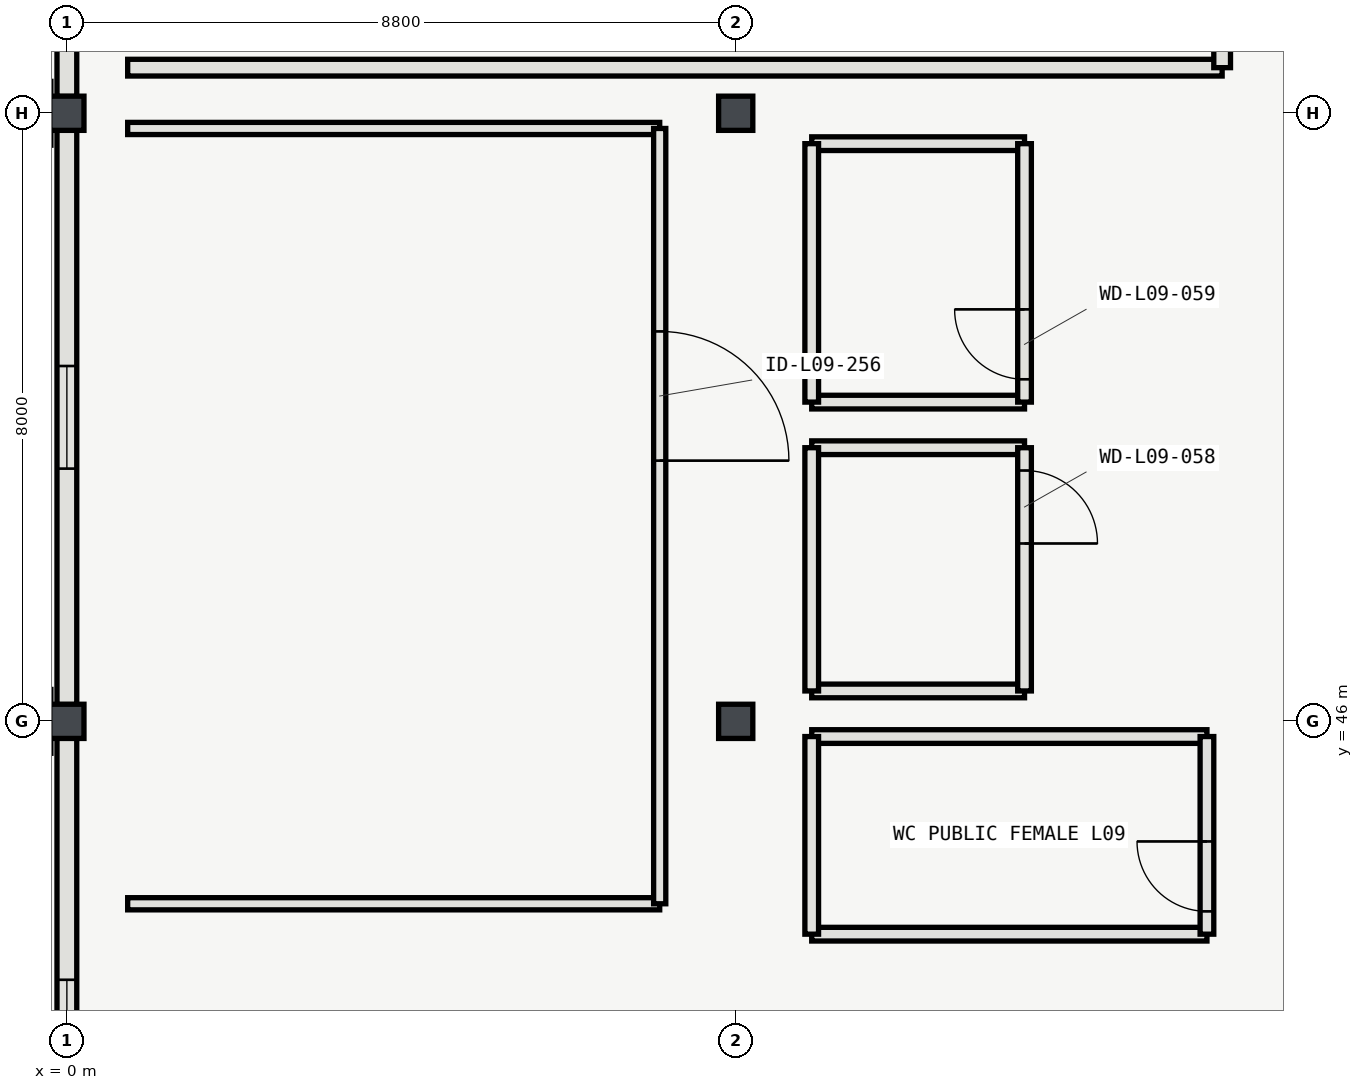
"""IFC4 building model, lengths in metres.
Left out: names, types, materials, properties, quantities, classifications, styles, units other than length and angle.
Written with IfcOpenShell. Run it as: python <this file> out.ifc"""

import sys

from ifc_helpers import new_model, si_unit, direction, frame, frame_2d, origin, origin_2d, place, context, subcontext, project, spatial, rectangle, hollow_rectangle, extrude, element, fill, save


model = new_model("IFC4")
c1 = context("Model", 3, precision=1e-05, world=origin(), true_north=direction((0.0, 1.0)))
c2 = subcontext(c1, "Body", "Model", "MODEL_VIEW")
j1 = project(units=[si_unit("LENGTHUNIT", "METRE"), si_unit("PLANEANGLEUNIT", "RADIAN")], contexts=[c1])
p1 = place(None, origin())
s1 = spatial("IfcSite", under=j1, at=p1, CompositionType="ELEMENT")
p2 = place(p1, origin())
s2 = spatial("IfcBuilding", under=s1, at=p2, CompositionType="ELEMENT")
p3 = place(p2, frame((0.0, 0.0, 41.4)))
s3 = spatial("IfcBuildingStorey", under=s2, at=p3, CompositionType="ELEMENT", Elevation=41.4)
for number, where, z_axis, x_axis in (
    (1, (0.0, 46.0, 0.0), (0.0, 0.0, 1.0), (1.0, 0.0, 0.0)),
    (2, (0.0, 54.0, 0.0), (0.0, 0.0, 1.0), (1.0, 0.0, 0.0)),
    (3, (8.8, 46.0, 0.0), (0.0, 0.0, 1.0), (1.0, 0.0, 0.0)),
    (4, (8.8, 54.0, 0.0), (0.0, 0.0, 1.0), (1.0, 0.0, 0.0)),
):
    element("IfcColumn", number, at=place(p3, frame(where, z_axis=z_axis, x_axis=x_axis)), inside=s3, PredefinedType="COLUMN", context=c2, shape_type="SweptSolid", body=[
        extrude(hollow_rectangle(XDim=0.45, YDim=0.45, WallThickness=0.018, InnerFilletRadius=0.018, OuterFilletRadius=0.036, at=origin_2d()), origin(), (0.0, 0.0, 1.0), 4.2),
    ])
p4 = place(p3, frame((0.0, 45.779, 0.0), z_axis=(0.0, 0.0, 1.0), x_axis=(0.0, -1.0, 0.0)))
e5 = element("IfcWall", 5, at=p4, inside=s3, PredefinedType="SOLIDWALL", context=c2, shape_type="SweptSolid", body=[
    extrude(rectangle(XDim=7.558, YDim=0.26, at=frame_2d((3.779, 0.0))), origin(), (0.0, 0.0, 1.0), 3.473),
])
p5 = place(p4, frame((3.179, 0.0, 0.95)))
e6 = element("IfcOpeningElement", 6, at=p5, cuts=e5, PredefinedType="OPENING", context=c2, shape_type="SweptSolid", body=[
    extrude(rectangle(XDim=1.2, YDim=1.8, at=frame_2d((0.6, 0.9))), frame((0.0, 0.14, 0.0), z_axis=(0.0, -1.0, 0.0), x_axis=(1.0, 0.0, 0.0)), (0.0, 0.0, 1.0), 0.28),
])
p6 = place(p3, frame((0.0, 53.779, 0.0), z_axis=(0.0, 0.0, 1.0), x_axis=(0.0, -1.0, 0.0)))
e7 = element("IfcWall", 7, at=p6, inside=s3, PredefinedType="SOLIDWALL", context=c2, shape_type="SweptSolid", body=[
    extrude(rectangle(XDim=7.558, YDim=0.26, at=frame_2d((3.779, 0.0))), origin(), (0.0, 0.0, 1.0), 3.473),
])
p7 = place(p6, frame((3.104, 0.0, 0.95)))
e8 = element("IfcOpeningElement", 8, at=p7, cuts=e7, PredefinedType="OPENING", context=c2, shape_type="SweptSolid", body=[
    extrude(rectangle(XDim=1.35, YDim=1.8, at=frame_2d((0.675, 0.9))), frame((0.0, 0.14, 0.0), z_axis=(0.0, -1.0, 0.0), x_axis=(1.0, 0.0, 0.0)), (0.0, 0.0, 1.0), 0.28),
])
p8 = place(p3, frame((0.0, 61.779, 0.0), z_axis=(0.0, 0.0, 1.0), x_axis=(0.0, -1.0, 0.0)))
e9 = element("IfcWall", 9, at=p8, inside=s3, PredefinedType="SOLIDWALL", context=c2, shape_type="SweptSolid", body=[
    extrude(rectangle(XDim=7.558, YDim=0.26, at=frame_2d((3.779, 0.0))), origin(), (0.0, 0.0, 1.0), 3.473),
])
p9 = place(p8, frame((3.029, 0.0, 0.95)))
e10 = element("IfcOpeningElement", 10, at=p9, cuts=e9, PredefinedType="OPENING", context=c2, shape_type="SweptSolid", body=[
    extrude(rectangle(XDim=1.5, YDim=1.8, at=frame_2d((0.75, 0.9))), frame((0.0, 0.14, 0.0), z_axis=(0.0, -1.0, 0.0), x_axis=(1.0, 0.0, 0.0)), (0.0, 0.0, 1.0), 0.28),
])
for number, where, z_axis, x_axis in (
    (11, (9.8, 46.4, 0.0), (0.0, 0.0, 1.0), (1.0, 0.0, 0.0)),
    (12, (12.6, 49.6, 0.0), (0.0, 0.0, 1.0), (-1.0, 0.0, 0.0)),
):
    element("IfcWall", number, at=place(p3, frame(where, z_axis=z_axis, x_axis=x_axis)), inside=s3, PredefinedType="PLUMBINGWALL", context=c2, shape_type="SweptSolid", body=[
        extrude(rectangle(XDim=2.8, YDim=0.18, at=frame_2d((1.4, 0.0))), origin(), (0.0, 0.0, 1.0), 3.92),
    ])
p10 = place(p3, frame((9.8, 49.6, 0.0), z_axis=(0.0, 0.0, 1.0), x_axis=(0.0, -1.0, 0.0)))
e13 = element("IfcWall", 13, at=p10, inside=s3, PredefinedType="PLUMBINGWALL", context=c2, shape_type="SweptSolid", body=[
    extrude(rectangle(XDim=3.2, YDim=0.18, at=frame_2d((1.6, 0.0))), origin(), (0.0, 0.0, 1.0), 3.92),
])
p11 = place(p3, frame((12.6, 46.4, 0.0), z_axis=(0.0, 0.0, 1.0), x_axis=(0.0, 1.0, 0.0)))
e14 = element("IfcWall", 14, at=p11, inside=s3, PredefinedType="PLUMBINGWALL", context=c2, shape_type="SweptSolid", body=[
    extrude(rectangle(XDim=3.2, YDim=0.18, at=frame_2d((1.6, 0.0))), origin(), (0.0, 0.0, 1.0), 3.92),
])
p12 = place(p11, frame((1.94, 0.0, 0.0)))
e15 = element("IfcOpeningElement", 15, at=p12, cuts=e14, PredefinedType="OPENING", context=c2, shape_type="SweptSolid", body=[
    extrude(rectangle(XDim=0.96, YDim=2.1, at=frame_2d((0.48, 1.05))), frame((0.0, 0.1, 0.0), z_axis=(0.0, -1.0, 0.0), x_axis=(1.0, 0.0, 0.0)), (0.0, 0.0, 1.0), 0.2),
])
for number, where, z_axis, x_axis in (
    (16, (9.8, 50.2, 0.0), (0.0, 0.0, 1.0), (1.0, 0.0, 0.0)),
    (17, (12.6, 53.6, 0.0), (0.0, 0.0, 1.0), (-1.0, 0.0, 0.0)),
):
    element("IfcWall", number, at=place(p3, frame(where, z_axis=z_axis, x_axis=x_axis)), inside=s3, PredefinedType="PLUMBINGWALL", context=c2, shape_type="SweptSolid", body=[
        extrude(rectangle(XDim=2.8, YDim=0.18, at=frame_2d((1.4, 0.0))), origin(), (0.0, 0.0, 1.0), 3.92),
    ])
p13 = place(p3, frame((9.8, 53.6, 0.0), z_axis=(0.0, 0.0, 1.0), x_axis=(0.0, -1.0, 0.0)))
e18 = element("IfcWall", 18, at=p13, inside=s3, PredefinedType="PLUMBINGWALL", context=c2, shape_type="SweptSolid", body=[
    extrude(rectangle(XDim=3.4, YDim=0.18, at=frame_2d((1.7, 0.0))), origin(), (0.0, 0.0, 1.0), 3.92),
])
p14 = place(p3, frame((12.6, 50.2, 0.0), z_axis=(0.0, 0.0, 1.0), x_axis=(0.0, 1.0, 0.0)))
e19 = element("IfcWall", 19, at=p14, inside=s3, PredefinedType="PLUMBINGWALL", context=c2, shape_type="SweptSolid", body=[
    extrude(rectangle(XDim=3.4, YDim=0.18, at=frame_2d((1.7, 0.0))), origin(), (0.0, 0.0, 1.0), 3.92),
])
p15 = place(p14, frame((0.3, 0.0, 0.0)))
e20 = element("IfcOpeningElement", 20, at=p15, cuts=e19, PredefinedType="OPENING", context=c2, shape_type="SweptSolid", body=[
    extrude(rectangle(XDim=0.92, YDim=2.1, at=frame_2d((0.46, 1.05))), frame((0.0, 0.1, 0.0), z_axis=(0.0, -1.0, 0.0), x_axis=(1.0, 0.0, 0.0)), (0.0, 0.0, 1.0), 0.2),
])
for number, where, z_axis, x_axis in (
    (21, (9.8, 43.2, 0.0), (0.0, 0.0, 1.0), (1.0, 0.0, 0.0)),
    (22, (15.0, 45.8, 0.0), (0.0, 0.0, 1.0), (-1.0, 0.0, 0.0)),
):
    element("IfcWall", number, at=place(p3, frame(where, z_axis=z_axis, x_axis=x_axis)), inside=s3, PredefinedType="PLUMBINGWALL", context=c2, shape_type="SweptSolid", body=[
        extrude(rectangle(XDim=5.2, YDim=0.18, at=frame_2d((2.6, 0.0))), origin(), (0.0, 0.0, 1.0), 3.92),
    ])
p16 = place(p3, frame((9.8, 45.8, 0.0), z_axis=(0.0, 0.0, 1.0), x_axis=(0.0, -1.0, 0.0)))
e23 = element("IfcWall", 23, at=p16, inside=s3, PredefinedType="PLUMBINGWALL", context=c2, shape_type="SweptSolid", body=[
    extrude(rectangle(XDim=2.6, YDim=0.18, at=frame_2d((1.3, 0.0))), origin(), (0.0, 0.0, 1.0), 3.92),
])
p17 = place(p3, frame((15.0, 43.2, 0.0), z_axis=(0.0, 0.0, 1.0), x_axis=(0.0, 1.0, 0.0)))
e24 = element("IfcWall", 24, at=p17, inside=s3, PredefinedType="PLUMBINGWALL", context=c2, shape_type="SweptSolid", body=[
    extrude(rectangle(XDim=2.6, YDim=0.18, at=frame_2d((1.3, 0.0))), origin(), (0.0, 0.0, 1.0), 3.92),
])
p18 = place(p17, frame((0.3, 0.0, 0.0)))
e25 = element("IfcOpeningElement", 25, at=p18, cuts=e24, PredefinedType="OPENING", context=c2, shape_type="SweptSolid", body=[
    extrude(rectangle(XDim=0.92, YDim=2.1, at=frame_2d((0.46, 1.05))), frame((0.0, 0.1, 0.0), z_axis=(0.0, -1.0, 0.0), x_axis=(1.0, 0.0, 0.0)), (0.0, 0.0, 1.0), 0.2),
])
p19 = place(p3, frame((0.8, 54.6, 0.0), z_axis=(0.0, 0.0, 1.0), x_axis=(1.0, 0.0, 0.0)))
e26 = element("IfcWall", 26, at=p19, inside=s3, PredefinedType="PARTITIONING", context=c2, shape_type="SweptSolid", body=[
    extrude(rectangle(XDim=14.4, YDim=0.22, at=frame_2d((7.2, 0.0))), origin(), (0.0, 0.0, 1.0), 3.92),
])
p20 = place(p3, frame((15.2, 54.6, 0.0), z_axis=(0.0, 0.0, 1.0), x_axis=(0.0, 1.0, 0.0)))
e27 = element("IfcWall", 27, at=p20, inside=s3, PredefinedType="PARTITIONING", context=c2, shape_type="SweptSolid", body=[
    extrude(rectangle(XDim=14.8, YDim=0.22, at=frame_2d((7.4, 0.0))), origin(), (0.0, 0.0, 1.0), 3.92),
])
p21 = place(p20, frame((10.46, 0.0, 0.0)))
e28 = element("IfcOpeningElement", 28, at=p21, cuts=e27, PredefinedType="OPENING", context=c2, shape_type="SweptSolid", body=[
    extrude(rectangle(XDim=1.5, YDim=2.3, at=frame_2d((0.75, 1.15))), frame((0.0, 0.12, 0.0), z_axis=(0.0, -1.0, 0.0), x_axis=(1.0, 0.0, 0.0)), (0.0, 0.0, 1.0), 0.24),
])
for number, where, z_axis, x_axis in (
    (29, (0.8, 43.6, 0.0), (0.0, 0.0, 1.0), (1.0, 0.0, 0.0)),
    (30, (7.8, 53.8, 0.0), (0.0, 0.0, 1.0), (-1.0, 0.0, 0.0)),
):
    element("IfcWall", number, at=place(p3, frame(where, z_axis=z_axis, x_axis=x_axis)), inside=s3, PredefinedType="PARTITIONING", context=c2, shape_type="SweptSolid", body=[
        extrude(rectangle(XDim=7.0, YDim=0.16, at=frame_2d((3.5, 0.0))), origin(), (0.0, 0.0, 1.0), 3.92),
    ])
p22 = place(p3, frame((7.8, 43.6, 0.0), z_axis=(0.0, 0.0, 1.0), x_axis=(0.0, 1.0, 0.0)))
e31 = element("IfcWall", 31, at=p22, inside=s3, PredefinedType="PARTITIONING", context=c2, shape_type="SweptSolid", body=[
    extrude(rectangle(XDim=10.2, YDim=0.16, at=frame_2d((5.1, 0.0))), origin(), (0.0, 0.0, 1.0), 3.92),
])
p23 = place(p22, frame((5.83, 0.0, 0.0)))
e32 = element("IfcOpeningElement", 32, at=p23, cuts=e31, PredefinedType="OPENING", context=c2, shape_type="SweptSolid", body=[
    extrude(rectangle(XDim=1.7, YDim=2.3, at=frame_2d((0.85, 1.15))), frame((0.0, 0.09, 0.0), z_axis=(0.0, -1.0, 0.0), x_axis=(1.0, 0.0, 0.0)), (0.0, 0.0, 1.0), 0.18),
])
p24 = place(p5, origin())
e33 = element("IfcWindow", 33, at=p24, inside=s3, PartitioningType="SINGLE_PANEL", PredefinedType="WINDOW", context=c2, shape_type="SweptSolid", body=[
    extrude(rectangle(XDim=1.2, YDim=1.8, at=frame_2d((0.6, 0.9))), frame((0.0, 0.03, 0.0), z_axis=(0.0, -1.0, 0.0), x_axis=(1.0, 0.0, 0.0)), (0.0, 0.0, 1.0), 0.06),
])
fill(e6, e33)
p25 = place(p7, origin())
e34 = element("IfcWindow", 34, at=p25, inside=s3, PartitioningType="SINGLE_PANEL", PredefinedType="WINDOW", context=c2, shape_type="SweptSolid", body=[
    extrude(rectangle(XDim=1.35, YDim=1.8, at=frame_2d((0.675, 0.9))), frame((0.0, 0.03, 0.0), z_axis=(0.0, -1.0, 0.0), x_axis=(1.0, 0.0, 0.0)), (0.0, 0.0, 1.0), 0.06),
])
fill(e8, e34)
p26 = place(p12, origin())
e35 = element("IfcDoor", 35, at=p26, inside=s3, OperationType="SINGLE_SWING_LEFT", PredefinedType="DOOR", context=c2, shape_type="SweptSolid", body=[
    extrude(rectangle(XDim=0.96, YDim=2.1, at=frame_2d((0.48, 1.05))), frame((0.0, 0.025, 0.0), z_axis=(0.0, -1.0, 0.0), x_axis=(1.0, 0.0, 0.0)), (0.0, 0.0, 1.0), 0.05),
])
fill(e15, e35)
p27 = place(p15, origin())
e36 = element("IfcDoor", 36, at=p27, inside=s3, OperationType="SINGLE_SWING_RIGHT", PredefinedType="DOOR", context=c2, shape_type="SweptSolid", body=[
    extrude(rectangle(XDim=0.92, YDim=2.1, at=frame_2d((0.46, 1.05))), frame((0.0, 0.025, 0.0), z_axis=(0.0, -1.0, 0.0), x_axis=(1.0, 0.0, 0.0)), (0.0, 0.0, 1.0), 0.05),
])
fill(e20, e36)
p28 = place(p18, origin())
e37 = element("IfcDoor", 37, at=p28, inside=s3, OperationType="SINGLE_SWING_RIGHT", PredefinedType="DOOR", context=c2, shape_type="SweptSolid", body=[
    extrude(rectangle(XDim=0.92, YDim=2.1, at=frame_2d((0.46, 1.05))), frame((0.0, 0.025, 0.0), z_axis=(0.0, -1.0, 0.0), x_axis=(1.0, 0.0, 0.0)), (0.0, 0.0, 1.0), 0.05),
])
fill(e25, e37)
p29 = place(p23, origin())
e38 = element("IfcDoor", 38, at=p29, inside=s3, OperationType="DOUBLE_DOOR_SINGLE_SWING", PredefinedType="DOOR", context=c2, shape_type="SweptSolid", body=[
    extrude(rectangle(XDim=1.7, YDim=2.3, at=frame_2d((0.85, 1.15))), frame((0.0, 0.025, 0.0), z_axis=(0.0, -1.0, 0.0), x_axis=(1.0, 0.0, 0.0)), (0.0, 0.0, 1.0), 0.05),
])
fill(e32, e38)
save(model, sys.argv[1])
